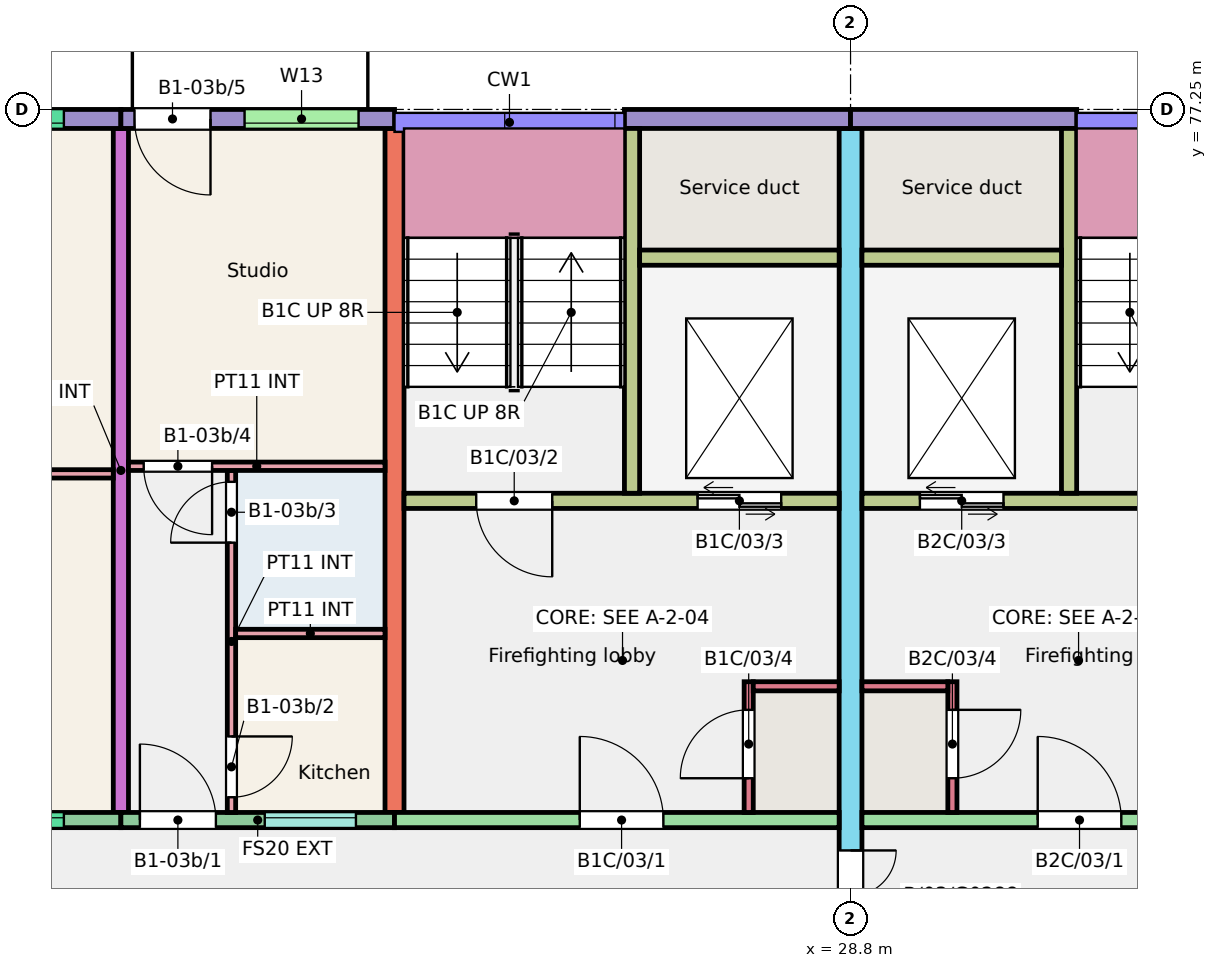
"""IFC4 building model, lengths in metres.
Left out: names, types, materials, properties, quantities, classifications, styles, units other than length and angle.
Written with IfcOpenShell. Run it as: python <this file> out.ifc"""

import sys

from ifc_helpers import new_model, si_unit, direction, frame, frame_2d, origin, place, context, subcontext, project, spatial, rectangle, extrude, element, fill, save


model = new_model("IFC4")
c1 = context("Model", 3, precision=1e-05, world=origin(), true_north=direction((0.0, 1.0)))
c2 = subcontext(c1, "Body", "Model", "MODEL_VIEW")
j1 = project(units=[si_unit("LENGTHUNIT", "METRE"), si_unit("PLANEANGLEUNIT", "RADIAN")], contexts=[c1])
p1 = place(None, origin())
s1 = spatial("IfcSite", under=j1, at=p1, CompositionType="ELEMENT")
p2 = place(p1, origin())
s2 = spatial("IfcBuilding", under=s1, at=p2, CompositionType="ELEMENT")
p3 = place(p2, frame((0.0, 0.0, 9.0)))
s3 = spatial("IfcBuildingStorey", under=s2, at=p3, CompositionType="ELEMENT", Elevation=9.0)
p4 = place(p3, frame((19.2, 68.0, 0.0), z_axis=(0.0, 0.0, 1.0), x_axis=(0.0, 1.0, 0.0)))
e1 = element("IfcWall", 1, at=p4, inside=s3, PredefinedType="SHEAR", context=c2, shape_type="SweptSolid", body=[
    extrude(rectangle(XDim=9.0, YDim=0.2, at=frame_2d((4.5, 0.0))), origin(), (0.0, 0.0, 1.0), 3.0),
])
p5 = place(p3, frame((22.8, 68.0, 0.0), z_axis=(0.0, 0.0, 1.0), x_axis=(0.0, 1.0, 0.0)))
e2 = element("IfcWall", 2, at=p5, inside=s3, PredefinedType="SHEAR", context=c2, shape_type="SweptSolid", body=[
    extrude(rectangle(XDim=9.0, YDim=0.25, at=frame_2d((4.5, 0.0))), origin(), (0.0, 0.0, 1.0), 3.0),
])
p6 = place(p3, frame((28.8, 66.0, 0.0), z_axis=(0.0, 0.0, 1.0), x_axis=(0.0, 1.0, 0.0)))
e3 = element("IfcWall", 3, at=p6, inside=s3, PredefinedType="SHEAR", context=c2, shape_type="SweptSolid", body=[
    extrude(rectangle(XDim=11.0, YDim=0.3, at=frame_2d((5.5, 0.0))), origin(), (0.0, 0.0, 1.0), 3.0),
])
p7 = place(p6, frame((0.3, 0.0, 0.0)))
e4 = element("IfcOpeningElement", 4, at=p7, cuts=e3, PredefinedType="OPENING", context=c2, shape_type="SweptSolid", body=[
    extrude(rectangle(XDim=1.2, YDim=2.1, at=frame_2d((0.6, 1.05))), frame((0.0, 0.16, 0.0), z_axis=(0.0, -1.0, 0.0), x_axis=(1.0, 0.0, 0.0)), (0.0, 0.0, 1.0), 0.32),
])
p8 = place(p3, frame((15.6, 77.125, 0.0), z_axis=(0.0, 0.0, 1.0), x_axis=(1.0, 0.0, 0.0)))
e5 = element("IfcWall", 5, at=p8, inside=s3, PredefinedType="SOLIDWALL", context=c2, shape_type="SweptSolid", body=[
    extrude(rectangle(XDim=3.6, YDim=0.25, at=frame_2d((1.8, 0.0))), origin(), (0.0, 0.0, 1.0), 3.0),
])
p9 = place(p8, frame((0.75, 0.0, 1.2)))
e6 = element("IfcOpeningElement", 6, at=p9, cuts=e5, PredefinedType="OPENING", context=c2, shape_type="SweptSolid", body=[
    extrude(rectangle(XDim=2.1, YDim=1.2, at=frame_2d((1.05, 0.6))), frame((0.0, 0.135, 0.0), z_axis=(0.0, -1.0, 0.0), x_axis=(1.0, 0.0, 0.0)), (0.0, 0.0, 1.0), 0.27),
])
p10 = place(p3, frame((15.6, 67.9, 0.0), z_axis=(0.0, 0.0, 1.0), x_axis=(1.0, 0.0, 0.0)))
e7 = element("IfcWall", 7, at=p10, inside=s3, PredefinedType="SOLIDWALL", context=c2, shape_type="SweptSolid", body=[
    extrude(rectangle(XDim=3.6, YDim=0.2, at=frame_2d((1.8, 0.0))), origin(), (0.0, 0.0, 1.0), 3.0),
])
p11 = place(p10, frame((0.75, 0.0, 1.2)))
e8 = element("IfcOpeningElement", 8, at=p11, cuts=e7, PredefinedType="OPENING", context=c2, shape_type="SweptSolid", body=[
    extrude(rectangle(XDim=2.1, YDim=1.2, at=frame_2d((1.05, 0.6))), frame((0.0, 0.11, 0.0), z_axis=(0.0, -1.0, 0.0), x_axis=(1.0, 0.0, 0.0)), (0.0, 0.0, 1.0), 0.22),
])
p12 = place(p3, frame((19.2, 77.125, 0.0), z_axis=(0.0, 0.0, 1.0), x_axis=(1.0, 0.0, 0.0)))
e9 = element("IfcWall", 9, at=p12, inside=s3, PredefinedType="SOLIDWALL", context=c2, shape_type="SweptSolid", body=[
    extrude(rectangle(XDim=3.6, YDim=0.25, at=frame_2d((1.8, 0.0))), origin(), (0.0, 0.0, 1.0), 3.0),
])
p13 = place(p12, frame((1.627, 0.0, 1.2)))
e10 = element("IfcOpeningElement", 10, at=p13, cuts=e9, PredefinedType="OPENING", context=c2, shape_type="SweptSolid", body=[
    extrude(rectangle(XDim=1.5, YDim=1.2, at=frame_2d((0.75, 0.6))), frame((0.0, 0.135, 0.0), z_axis=(0.0, -1.0, 0.0), x_axis=(1.0, 0.0, 0.0)), (0.0, 0.0, 1.0), 0.27),
])
p14 = place(p12, frame((0.179, 0.0, 0.0)))
e11 = element("IfcOpeningElement", 11, at=p14, cuts=e9, PredefinedType="OPENING", context=c2, shape_type="SweptSolid", body=[
    extrude(rectangle(XDim=1.0, YDim=2.1, at=frame_2d((0.5, 1.05))), frame((0.0, 0.135, 0.0), z_axis=(0.0, -1.0, 0.0), x_axis=(1.0, 0.0, 0.0)), (0.0, 0.0, 1.0), 0.27),
])
p15 = place(p3, frame((19.2, 67.9, 0.0), z_axis=(0.0, 0.0, 1.0), x_axis=(1.0, 0.0, 0.0)))
e12 = element("IfcWall", 12, at=p15, inside=s3, PredefinedType="SOLIDWALL", context=c2, shape_type="SweptSolid", body=[
    extrude(rectangle(XDim=3.6, YDim=0.2, at=frame_2d((1.8, 0.0))), origin(), (0.0, 0.0, 1.0), 3.0),
])
p16 = place(p15, frame((1.893, 0.0, 1.1)))
e13 = element("IfcOpeningElement", 13, at=p16, cuts=e12, PredefinedType="OPENING", context=c2, shape_type="SweptSolid", body=[
    extrude(rectangle(XDim=1.2, YDim=1.3, at=frame_2d((0.6, 0.65))), frame((0.0, 0.11, 0.0), z_axis=(0.0, -1.0, 0.0), x_axis=(1.0, 0.0, 0.0)), (0.0, 0.0, 1.0), 0.22),
])
p17 = place(p15, frame((0.25, 0.0, 0.0)))
e14 = element("IfcOpeningElement", 14, at=p17, cuts=e12, PredefinedType="OPENING", context=c2, shape_type="SweptSolid", body=[
    extrude(rectangle(XDim=1.0, YDim=2.1, at=frame_2d((0.5, 1.05))), frame((0.0, 0.11, 0.0), z_axis=(0.0, -1.0, 0.0), x_axis=(1.0, 0.0, 0.0)), (0.0, 0.0, 1.0), 0.22),
])
p18 = place(p3, frame((25.825, 77.125, 0.0), z_axis=(0.0, 0.0, 1.0), x_axis=(1.0, 0.0, 0.0)))
e15 = element("IfcWall", 15, at=p18, inside=s3, PredefinedType="SOLIDWALL", context=c2, shape_type="SweptSolid", body=[
    extrude(rectangle(XDim=2.975, YDim=0.25, at=frame_2d((1.488, 0.0))), origin(), (0.0, 0.0, 1.0), 3.0),
])
p19 = place(p3, frame((22.8, 67.9, 0.0), z_axis=(0.0, 0.0, 1.0), x_axis=(1.0, 0.0, 0.0)))
e16 = element("IfcWall", 16, at=p19, inside=s3, PredefinedType="SHEAR", context=c2, shape_type="SweptSolid", body=[
    extrude(rectangle(XDim=5.85, YDim=0.2, at=frame_2d((2.925, 0.0))), origin(), (0.0, 0.0, 1.0), 3.0),
])
p20 = place(p19, frame((2.438, 0.0, 0.0)))
e17 = element("IfcOpeningElement", 17, at=p20, cuts=e16, PredefinedType="OPENING", context=c2, shape_type="SweptSolid", body=[
    extrude(rectangle(XDim=1.1, YDim=2.1, at=frame_2d((0.55, 1.05))), frame((0.0, 0.11, 0.0), z_axis=(0.0, -1.0, 0.0), x_axis=(1.0, 0.0, 0.0)), (0.0, 0.0, 1.0), 0.22),
])
p21 = place(p3, frame((22.925, 72.1, 0.0), z_axis=(0.0, 0.0, 1.0), x_axis=(1.0, 0.0, 0.0)))
e18 = element("IfcWall", 18, at=p21, inside=s3, PredefinedType="SHEAR", context=c2, shape_type="SweptSolid", body=[
    extrude(rectangle(XDim=5.725, YDim=0.2, at=frame_2d((2.862, 0.0))), origin(), (0.0, 0.0, 1.0), 3.0),
])
p22 = place(p21, frame((0.95, 0.0, 0.0)))
e19 = element("IfcOpeningElement", 19, at=p22, cuts=e18, PredefinedType="OPENING", context=c2, shape_type="SweptSolid", body=[
    extrude(rectangle(XDim=1.0, YDim=2.1, at=frame_2d((0.5, 1.05))), frame((0.0, 0.11, 0.0), z_axis=(0.0, -1.0, 0.0), x_axis=(1.0, 0.0, 0.0)), (0.0, 0.0, 1.0), 0.22),
])
p23 = place(p21, frame((3.863, 0.0, 0.0)))
e20 = element("IfcOpeningElement", 20, at=p23, cuts=e18, PredefinedType="OPENING", context=c2, shape_type="SweptSolid", body=[
    extrude(rectangle(XDim=1.1, YDim=2.1, at=frame_2d((0.55, 1.05))), frame((0.0, 0.11, 0.0), z_axis=(0.0, -1.0, 0.0), x_axis=(1.0, 0.0, 0.0)), (0.0, 0.0, 1.0), 0.22),
])
p24 = place(p3, frame((25.925, 72.2, 0.0), z_axis=(0.0, 0.0, 1.0), x_axis=(0.0, 1.0, 0.0)))
e21 = element("IfcWall", 21, at=p24, inside=s3, PredefinedType="SHEAR", context=c2, shape_type="SweptSolid", body=[
    extrude(rectangle(XDim=4.8, YDim=0.2, at=frame_2d((2.4, 0.0))), origin(), (0.0, 0.0, 1.0), 3.0),
])
p25 = place(p3, frame((26.025, 75.3, 0.0), z_axis=(0.0, 0.0, 1.0), x_axis=(1.0, 0.0, 0.0)))
e22 = element("IfcWall", 22, at=p25, inside=s3, PredefinedType="SHEAR", context=c2, shape_type="SweptSolid", body=[
    extrude(rectangle(XDim=2.625, YDim=0.2, at=frame_2d((1.312, 0.0))), origin(), (0.0, 0.0, 1.0), 3.0),
])
p26 = place(p3, frame((27.46, 68.0, 0.0), z_axis=(0.0, 0.0, 1.0), x_axis=(0.0, 1.0, 0.0)))
e23 = element("IfcWall", 23, at=p26, inside=s3, PredefinedType="SHEAR", context=c2, shape_type="SweptSolid", body=[
    extrude(rectangle(XDim=1.72, YDim=0.12, at=frame_2d((0.86, 0.0))), origin(), (0.0, 0.0, 1.0), 3.0),
])
p27 = place(p26, frame((0.45, 0.0, 0.0)))
e24 = element("IfcOpeningElement", 24, at=p27, cuts=e23, PredefinedType="OPENING", context=c2, shape_type="SweptSolid", body=[
    extrude(rectangle(XDim=0.9, YDim=2.1, at=frame_2d((0.45, 1.05))), frame((0.0, 0.07, 0.0), z_axis=(0.0, -1.0, 0.0), x_axis=(1.0, 0.0, 0.0)), (0.0, 0.0, 1.0), 0.14),
])
p28 = place(p3, frame((27.52, 69.66, 0.0), z_axis=(0.0, 0.0, 1.0), x_axis=(1.0, 0.0, 0.0)))
e25 = element("IfcWall", 25, at=p28, inside=s3, PredefinedType="SHEAR", context=c2, shape_type="SweptSolid", body=[
    extrude(rectangle(XDim=1.13, YDim=0.12, at=frame_2d((0.565, 0.0))), origin(), (0.0, 0.0, 1.0), 3.0),
])
p29 = place(p3, frame((28.8, 77.125, 0.0), z_axis=(0.0, 0.0, 1.0), x_axis=(1.0, 0.0, 0.0)))
e26 = element("IfcWall", 26, at=p29, inside=s3, PredefinedType="SOLIDWALL", context=c2, shape_type="SweptSolid", body=[
    extrude(rectangle(XDim=2.975, YDim=0.25, at=frame_2d((1.487, 0.0))), origin(), (0.0, 0.0, 1.0), 3.0),
])
p30 = place(p3, frame((28.95, 67.9, 0.0), z_axis=(0.0, 0.0, 1.0), x_axis=(1.0, 0.0, 0.0)))
e27 = element("IfcWall", 27, at=p30, inside=s3, PredefinedType="SHEAR", context=c2, shape_type="SweptSolid", body=[
    extrude(rectangle(XDim=5.85, YDim=0.2, at=frame_2d((2.925, 0.0))), origin(), (0.0, 0.0, 1.0), 3.0),
])
p31 = place(p30, frame((2.312, 0.0, 0.0)))
e28 = element("IfcOpeningElement", 28, at=p31, cuts=e27, PredefinedType="OPENING", context=c2, shape_type="SweptSolid", body=[
    extrude(rectangle(XDim=1.1, YDim=2.1, at=frame_2d((0.55, 1.05))), frame((0.0, 0.11, 0.0), z_axis=(0.0, -1.0, 0.0), x_axis=(1.0, 0.0, 0.0)), (0.0, 0.0, 1.0), 0.22),
])
p32 = place(p3, frame((28.95, 72.1, 0.0), z_axis=(0.0, 0.0, 1.0), x_axis=(1.0, 0.0, 0.0)))
e29 = element("IfcWall", 29, at=p32, inside=s3, PredefinedType="SHEAR", context=c2, shape_type="SweptSolid", body=[
    extrude(rectangle(XDim=5.725, YDim=0.2, at=frame_2d((2.863, 0.0))), origin(), (0.0, 0.0, 1.0), 3.0),
])
p33 = place(p32, frame((3.775, 0.0, 0.0)))
e30 = element("IfcOpeningElement", 30, at=p33, cuts=e29, PredefinedType="OPENING", context=c2, shape_type="SweptSolid", body=[
    extrude(rectangle(XDim=1.0, YDim=2.1, at=frame_2d((0.5, 1.05))), frame((0.0, 0.11, 0.0), z_axis=(0.0, -1.0, 0.0), x_axis=(1.0, 0.0, 0.0)), (0.0, 0.0, 1.0), 0.22),
])
p34 = place(p32, frame((0.762, 0.0, 0.0)))
e31 = element("IfcOpeningElement", 31, at=p34, cuts=e29, PredefinedType="OPENING", context=c2, shape_type="SweptSolid", body=[
    extrude(rectangle(XDim=1.1, YDim=2.1, at=frame_2d((0.55, 1.05))), frame((0.0, 0.11, 0.0), z_axis=(0.0, -1.0, 0.0), x_axis=(1.0, 0.0, 0.0)), (0.0, 0.0, 1.0), 0.22),
])
p35 = place(p3, frame((31.675, 72.2, 0.0), z_axis=(0.0, 0.0, 1.0), x_axis=(0.0, 1.0, 0.0)))
e32 = element("IfcWall", 32, at=p35, inside=s3, PredefinedType="SHEAR", context=c2, shape_type="SweptSolid", body=[
    extrude(rectangle(XDim=4.8, YDim=0.2, at=frame_2d((2.4, 0.0))), origin(), (0.0, 0.0, 1.0), 3.0),
])
p36 = place(p3, frame((28.95, 75.3, 0.0), z_axis=(0.0, 0.0, 1.0), x_axis=(1.0, 0.0, 0.0)))
e33 = element("IfcWall", 33, at=p36, inside=s3, PredefinedType="SHEAR", context=c2, shape_type="SweptSolid", body=[
    extrude(rectangle(XDim=2.625, YDim=0.2, at=frame_2d((1.312, 0.0))), origin(), (0.0, 0.0, 1.0), 3.0),
])
p37 = place(p3, frame((30.14, 68.0, 0.0), z_axis=(0.0, 0.0, 1.0), x_axis=(0.0, 1.0, 0.0)))
e34 = element("IfcWall", 34, at=p37, inside=s3, PredefinedType="SHEAR", context=c2, shape_type="SweptSolid", body=[
    extrude(rectangle(XDim=1.72, YDim=0.12, at=frame_2d((0.86, 0.0))), origin(), (0.0, 0.0, 1.0), 3.0),
])
p38 = place(p37, frame((0.45, 0.0, 0.0)))
e35 = element("IfcOpeningElement", 35, at=p38, cuts=e34, PredefinedType="OPENING", context=c2, shape_type="SweptSolid", body=[
    extrude(rectangle(XDim=0.9, YDim=2.1, at=frame_2d((0.45, 1.05))), frame((0.0, 0.07, 0.0), z_axis=(0.0, -1.0, 0.0), x_axis=(1.0, 0.0, 0.0)), (0.0, 0.0, 1.0), 0.14),
])
p39 = place(p3, frame((28.95, 69.66, 0.0), z_axis=(0.0, 0.0, 1.0), x_axis=(1.0, 0.0, 0.0)))
e36 = element("IfcWall", 36, at=p39, inside=s3, PredefinedType="SHEAR", context=c2, shape_type="SweptSolid", body=[
    extrude(rectangle(XDim=1.13, YDim=0.12, at=frame_2d((0.565, 0.0))), origin(), (0.0, 0.0, 1.0), 3.0),
])
p40 = place(p3, frame((15.7, 72.455, 0.0), z_axis=(0.0, 0.0, 1.0), x_axis=(1.0, 0.0, 0.0)))
e37 = element("IfcWall", 37, at=p40, inside=s3, PredefinedType="PARTITIONING", context=c2, shape_type="SweptSolid", body=[
    extrude(rectangle(XDim=3.4, YDim=0.11, at=frame_2d((1.7, 0.0))), origin(), (0.0, 0.0, 1.0), 2.8),
])
p41 = place(p3, frame((20.655, 68.0, 0.0), z_axis=(0.0, 0.0, 1.0), x_axis=(0.0, 1.0, 0.0)))
e38 = element("IfcWall", 38, at=p41, inside=s3, PredefinedType="PARTITIONING", context=c2, shape_type="SweptSolid", body=[
    extrude(rectangle(XDim=4.5, YDim=0.11, at=frame_2d((2.25, 0.0))), origin(), (0.0, 0.0, 1.0), 2.8),
])
p42 = place(p41, frame((0.2, 0.0, 0.0)))
e39 = element("IfcOpeningElement", 39, at=p42, cuts=e38, PredefinedType="OPENING", context=c2, shape_type="SweptSolid", body=[
    extrude(rectangle(XDim=0.8, YDim=2.1, at=frame_2d((0.4, 1.05))), frame((0.0, 0.065, 0.0), z_axis=(0.0, -1.0, 0.0), x_axis=(1.0, 0.0, 0.0)), (0.0, 0.0, 1.0), 0.13),
])
p43 = place(p41, frame((3.55, 0.0, 0.0)))
e40 = element("IfcOpeningElement", 40, at=p43, cuts=e38, PredefinedType="OPENING", context=c2, shape_type="SweptSolid", body=[
    extrude(rectangle(XDim=0.8, YDim=2.1, at=frame_2d((0.4, 1.05))), frame((0.0, 0.065, 0.0), z_axis=(0.0, -1.0, 0.0), x_axis=(1.0, 0.0, 0.0)), (0.0, 0.0, 1.0), 0.13),
])
p44 = place(p3, frame((20.71, 70.355, 0.0), z_axis=(0.0, 0.0, 1.0), x_axis=(1.0, 0.0, 0.0)))
e41 = element("IfcWall", 41, at=p44, inside=s3, PredefinedType="PARTITIONING", context=c2, shape_type="SweptSolid", body=[
    extrude(rectangle(XDim=1.965, YDim=0.11, at=frame_2d((0.982, 0.0))), origin(), (0.0, 0.0, 1.0), 2.8),
])
p45 = place(p3, frame((19.3, 72.555, 0.0), z_axis=(0.0, 0.0, 1.0), x_axis=(1.0, 0.0, 0.0)))
e42 = element("IfcWall", 42, at=p45, inside=s3, PredefinedType="PARTITIONING", context=c2, shape_type="SweptSolid", body=[
    extrude(rectangle(XDim=3.375, YDim=0.11, at=frame_2d((1.688, 0.0))), origin(), (0.0, 0.0, 1.0), 2.8),
])
p46 = place(p45, frame((0.2, 0.0, 0.0)))
e43 = element("IfcOpeningElement", 43, at=p46, cuts=e42, PredefinedType="OPENING", context=c2, shape_type="SweptSolid", body=[
    extrude(rectangle(XDim=0.9, YDim=2.1, at=frame_2d((0.45, 1.05))), frame((0.0, 0.065, 0.0), z_axis=(0.0, -1.0, 0.0), x_axis=(1.0, 0.0, 0.0)), (0.0, 0.0, 1.0), 0.13),
])
p47 = place(p11, origin())
e44 = element("IfcWindow", 44, at=p47, inside=s3, PartitioningType="SINGLE_PANEL", PredefinedType="WINDOW", context=c2, shape_type="SweptSolid", body=[
    extrude(rectangle(XDim=2.1, YDim=1.2, at=frame_2d((1.05, 0.6))), frame((0.0, 0.06, 0.0), z_axis=(0.0, -1.0, 0.0), x_axis=(1.0, 0.0, 0.0)), (0.0, 0.0, 1.0), 0.06),
])
fill(e8, e44)
p48 = place(p9, origin())
e45 = element("IfcWindow", 45, at=p48, inside=s3, PartitioningType="SINGLE_PANEL", PredefinedType="WINDOW", context=c2, shape_type="SweptSolid", body=[
    extrude(rectangle(XDim=2.1, YDim=1.2, at=frame_2d((1.05, 0.6))), frame((0.0, -0.025, 0.0), z_axis=(0.0, -1.0, 0.0), x_axis=(1.0, 0.0, 0.0)), (0.0, 0.0, 1.0), 0.06),
])
fill(e6, e45)
p49 = place(p16, origin())
e46 = element("IfcWindow", 46, at=p49, inside=s3, PartitioningType="SINGLE_PANEL", PredefinedType="WINDOW", context=c2, shape_type="SweptSolid", body=[
    extrude(rectangle(XDim=1.2, YDim=1.3, at=frame_2d((0.6, 0.65))), frame((0.0, 0.06, 0.0), z_axis=(0.0, -1.0, 0.0), x_axis=(1.0, 0.0, 0.0)), (0.0, 0.0, 1.0), 0.06),
])
fill(e13, e46)
p50 = place(p13, origin())
e47 = element("IfcWindow", 47, at=p50, inside=s3, PartitioningType="SINGLE_PANEL", PredefinedType="WINDOW", context=c2, shape_type="SweptSolid", body=[
    extrude(rectangle(XDim=1.5, YDim=1.2, at=frame_2d((0.75, 0.6))), frame((0.0, -0.025, 0.0), z_axis=(0.0, -1.0, 0.0), x_axis=(1.0, 0.0, 0.0)), (0.0, 0.0, 1.0), 0.06),
])
fill(e10, e47)
p51 = place(p17, origin())
e48 = element("IfcDoor", 48, at=p51, inside=s3, OperationType="SINGLE_SWING_LEFT", PredefinedType="DOOR", context=c2, shape_type="SweptSolid", body=[
    extrude(rectangle(XDim=1.0, YDim=2.1, at=frame_2d((0.5, 1.05))), frame((0.0, 0.025, 0.0), z_axis=(0.0, -1.0, 0.0), x_axis=(1.0, 0.0, 0.0)), (0.0, 0.0, 1.0), 0.05),
])
fill(e14, e48)
p52 = place(p42, origin())
e49 = element("IfcDoor", 49, at=p52, inside=s3, OperationType="SINGLE_SWING_RIGHT", PredefinedType="DOOR", context=c2, shape_type="SweptSolid", body=[
    extrude(rectangle(XDim=0.8, YDim=2.1, at=frame_2d((0.4, 1.05))), frame((0.0, 0.025, 0.0), z_axis=(0.0, -1.0, 0.0), x_axis=(1.0, 0.0, 0.0)), (0.0, 0.0, 1.0), 0.05),
])
fill(e39, e49)
p53 = place(p43, origin())
e50 = element("IfcDoor", 50, at=p53, inside=s3, OperationType="SINGLE_SWING_LEFT", PredefinedType="DOOR", context=c2, shape_type="SweptSolid", body=[
    extrude(rectangle(XDim=0.8, YDim=2.1, at=frame_2d((0.4, 1.05))), frame((0.0, 0.025, 0.0), z_axis=(0.0, -1.0, 0.0), x_axis=(1.0, 0.0, 0.0)), (0.0, 0.0, 1.0), 0.05),
])
fill(e40, e50)
p54 = place(p46, origin())
e51 = element("IfcDoor", 51, at=p54, inside=s3, OperationType="SINGLE_SWING_RIGHT", PredefinedType="DOOR", context=c2, shape_type="SweptSolid", body=[
    extrude(rectangle(XDim=0.9, YDim=2.1, at=frame_2d((0.45, 1.05))), frame((0.0, 0.025, 0.0), z_axis=(0.0, -1.0, 0.0), x_axis=(1.0, 0.0, 0.0)), (0.0, 0.0, 1.0), 0.05),
])
fill(e43, e51)
p55 = place(p14, origin())
e52 = element("IfcDoor", 52, at=p55, inside=s3, OperationType="SINGLE_SWING_RIGHT", PredefinedType="DOOR", context=c2, shape_type="SweptSolid", body=[
    extrude(rectangle(XDim=1.0, YDim=2.1, at=frame_2d((0.5, 1.05))), frame((0.0, 0.025, 0.0), z_axis=(0.0, -1.0, 0.0), x_axis=(1.0, 0.0, 0.0)), (0.0, 0.0, 1.0), 0.05),
])
fill(e11, e52)
p56 = place(p20, origin())
e53 = element("IfcDoor", 53, at=p56, inside=s3, OperationType="SINGLE_SWING_LEFT", PredefinedType="DOOR", context=c2, shape_type="SweptSolid", body=[
    extrude(rectangle(XDim=1.1, YDim=2.1, at=frame_2d((0.55, 1.05))), frame((0.0, 0.025, 0.0), z_axis=(0.0, -1.0, 0.0), x_axis=(1.0, 0.0, 0.0)), (0.0, 0.0, 1.0), 0.05),
])
fill(e17, e53)
p57 = place(p22, origin())
e54 = element("IfcDoor", 54, at=p57, inside=s3, OperationType="SINGLE_SWING_RIGHT", PredefinedType="DOOR", context=c2, shape_type="SweptSolid", body=[
    extrude(rectangle(XDim=1.0, YDim=2.1, at=frame_2d((0.5, 1.05))), frame((0.0, 0.025, 0.0), z_axis=(0.0, -1.0, 0.0), x_axis=(1.0, 0.0, 0.0)), (0.0, 0.0, 1.0), 0.05),
])
fill(e19, e54)
p58 = place(p23, origin())
e55 = element("IfcDoor", 55, at=p58, inside=s3, OperationType="DOUBLE_DOOR_SLIDING", PredefinedType="DOOR", context=c2, shape_type="SweptSolid", body=[
    extrude(rectangle(XDim=1.1, YDim=2.1, at=frame_2d((0.55, 1.05))), frame((0.0, 0.025, 0.0), z_axis=(0.0, -1.0, 0.0), x_axis=(1.0, 0.0, 0.0)), (0.0, 0.0, 1.0), 0.05),
])
fill(e20, e55)
p59 = place(p27, origin())
e56 = element("IfcDoor", 56, at=p59, inside=s3, OperationType="SINGLE_SWING_LEFT", PredefinedType="DOOR", context=c2, shape_type="SweptSolid", body=[
    extrude(rectangle(XDim=0.9, YDim=2.1, at=frame_2d((0.45, 1.05))), frame((0.0, 0.025, 0.0), z_axis=(0.0, -1.0, 0.0), x_axis=(1.0, 0.0, 0.0)), (0.0, 0.0, 1.0), 0.05),
])
fill(e24, e56)
p60 = place(p31, origin())
e57 = element("IfcDoor", 57, at=p60, inside=s3, OperationType="SINGLE_SWING_LEFT", PredefinedType="DOOR", context=c2, shape_type="SweptSolid", body=[
    extrude(rectangle(XDim=1.1, YDim=2.1, at=frame_2d((0.55, 1.05))), frame((0.0, 0.025, 0.0), z_axis=(0.0, -1.0, 0.0), x_axis=(1.0, 0.0, 0.0)), (0.0, 0.0, 1.0), 0.05),
])
fill(e28, e57)
p61 = place(p34, origin())
e58 = element("IfcDoor", 58, at=p61, inside=s3, OperationType="DOUBLE_DOOR_SLIDING", PredefinedType="DOOR", context=c2, shape_type="SweptSolid", body=[
    extrude(rectangle(XDim=1.1, YDim=2.1, at=frame_2d((0.55, 1.05))), frame((0.0, 0.025, 0.0), z_axis=(0.0, -1.0, 0.0), x_axis=(1.0, 0.0, 0.0)), (0.0, 0.0, 1.0), 0.05),
])
fill(e31, e58)
p62 = place(p38, origin())
e59 = element("IfcDoor", 59, at=p62, inside=s3, OperationType="SINGLE_SWING_RIGHT", PredefinedType="DOOR", context=c2, shape_type="SweptSolid", body=[
    extrude(rectangle(XDim=0.9, YDim=2.1, at=frame_2d((0.45, 1.05))), frame((0.0, 0.025, 0.0), z_axis=(0.0, -1.0, 0.0), x_axis=(1.0, 0.0, 0.0)), (0.0, 0.0, 1.0), 0.05),
])
fill(e35, e59)
p63 = place(p7, origin())
e60 = element("IfcDoor", 60, at=p63, inside=s3, OperationType="DOUBLE_DOOR_SINGLE_SWING", PredefinedType="DOOR", context=c2, shape_type="SweptSolid", body=[
    extrude(rectangle(XDim=1.2, YDim=2.1, at=frame_2d((0.6, 1.05))), frame((0.0, 0.025, 0.0), z_axis=(0.0, -1.0, 0.0), x_axis=(1.0, 0.0, 0.0)), (0.0, 0.0, 1.0), 0.05),
])
fill(e4, e60)
save(model, sys.argv[1])
